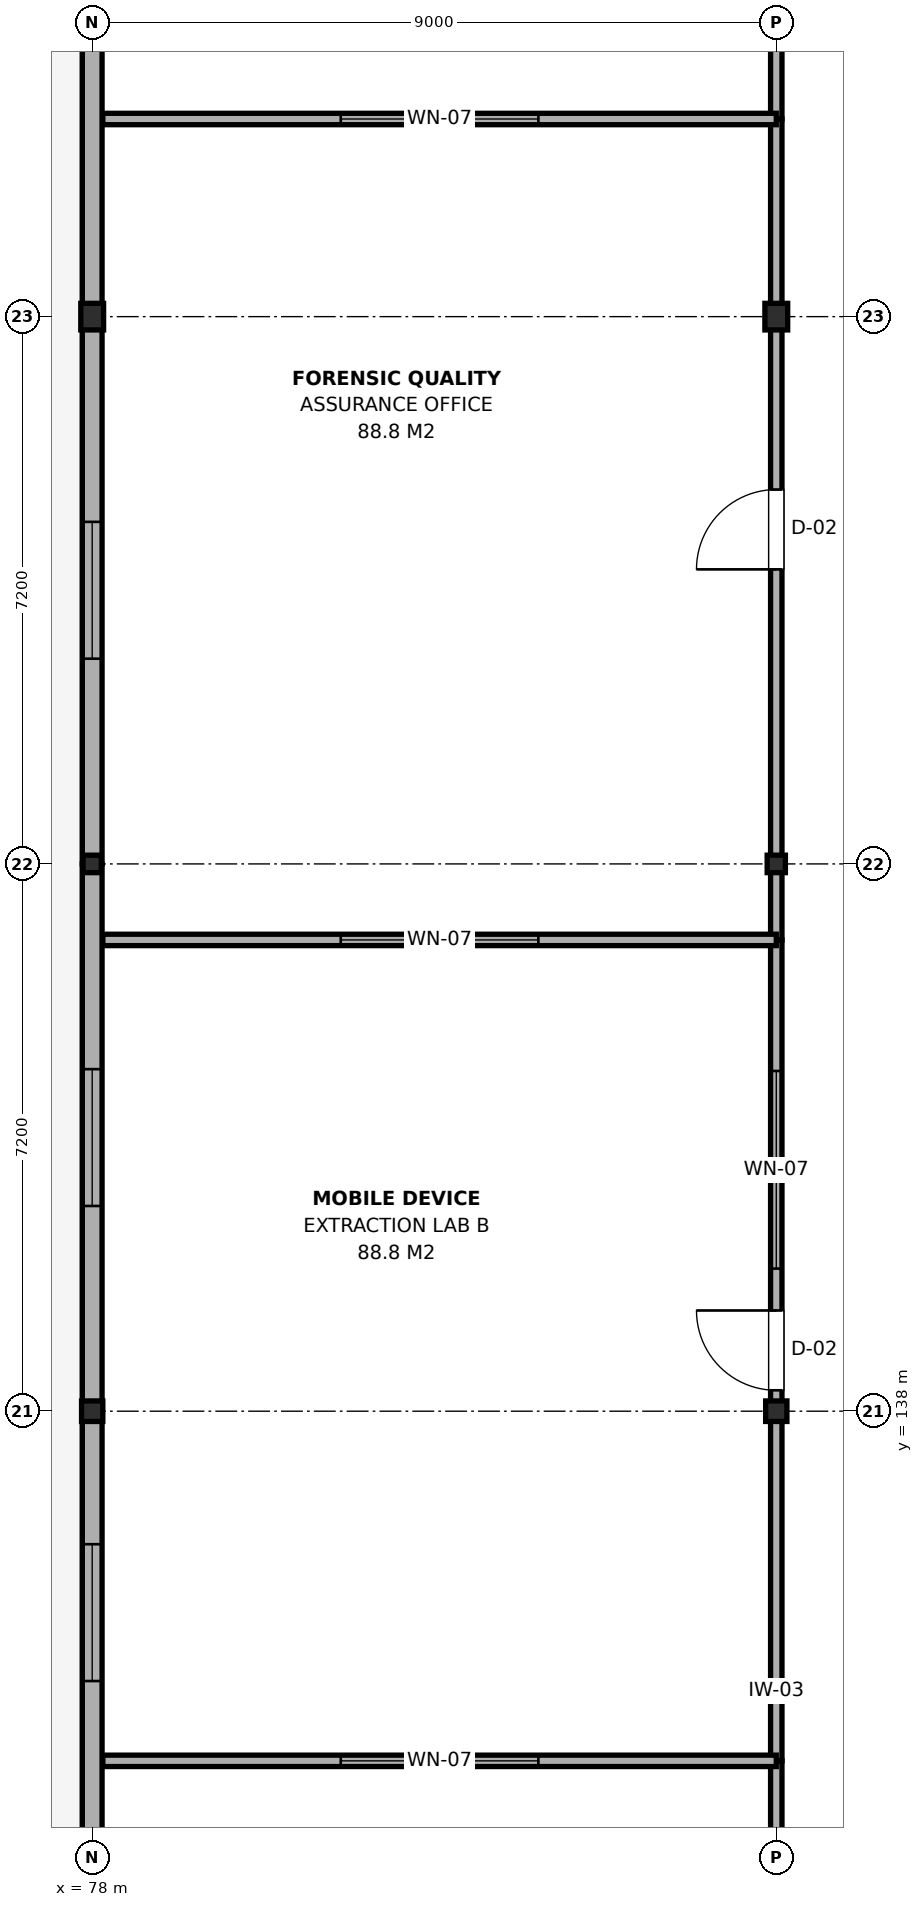
"""IFC4 building model, lengths in metres.
Left out: names, types, materials, properties, quantities, classifications, styles, units other than length and angle.
Written with IfcOpenShell. Run it as: python <this file> out.ifc"""

import sys

from ifc_helpers import new_model, si_unit, direction, frame, frame_2d, origin, origin_2d, place, context, subcontext, project, spatial, rectangle, i_section, extrude, element, fill, save


model = new_model("IFC4")
c1 = context("Model", 3, precision=1e-05, world=origin(), true_north=direction((0.0, 1.0)))
c2 = subcontext(c1, "Body", "Model", "MODEL_VIEW")
j1 = project(units=[si_unit("LENGTHUNIT", "METRE"), si_unit("PLANEANGLEUNIT", "RADIAN")], contexts=[c1])
p1 = place(None, origin())
s1 = spatial("IfcSite", under=j1, at=p1, CompositionType="ELEMENT")
p2 = place(p1, origin())
s2 = spatial("IfcBuilding", under=s1, at=p2, CompositionType="ELEMENT")
p3 = place(p2, frame((0.0, 0.0, 21.0)))
s3 = spatial("IfcBuildingStorey", under=s2, at=p3, CompositionType="ELEMENT", Elevation=21.0)
p4 = place(p3, frame((78.0, 138.0, 0.0), z_axis=(0.0, 0.0, 1.0), x_axis=(1.0, 0.0, 0.0)))
e1 = element("IfcColumn", 1, at=p4, inside=s3, PredefinedType="COLUMN", context=c2, shape_type="SweptSolid", body=[
    extrude(i_section(OverallWidth=0.28, OverallDepth=0.27, WebThickness=0.008, FlangeThickness=0.013, FilletRadius=0.024, at=origin_2d()), origin(), (0.0, 0.0, 1.0), 3.7),
])
p5 = place(p3, frame((78.0, 145.2, 0.0), z_axis=(0.0, 0.0, 1.0), x_axis=(1.0, 0.0, 0.0)))
e2 = element("IfcColumn", 2, at=p5, inside=s3, PredefinedType="COLUMN", context=c2, shape_type="SweptSolid", body=[
    extrude(i_section(OverallWidth=0.24, OverallDepth=0.23, WebThickness=0.008, FlangeThickness=0.012, FilletRadius=0.021, at=origin_2d()), origin(), (0.0, 0.0, 1.0), 3.7),
])
p6 = place(p3, frame((78.0, 152.4, 0.0), z_axis=(0.0, 0.0, 1.0), x_axis=(1.0, 0.0, 0.0)))
e3 = element("IfcColumn", 3, at=p6, inside=s3, PredefinedType="COLUMN", context=c2, shape_type="SweptSolid", body=[
    extrude(i_section(OverallWidth=0.3, OverallDepth=0.35, WebThickness=0.01, FlangeThickness=0.018, FilletRadius=0.027, at=origin_2d()), origin(), (0.0, 0.0, 1.0), 3.7),
])
p7 = place(p3, frame((87.0, 138.0, 0.0), z_axis=(0.0, 0.0, 1.0), x_axis=(1.0, 0.0, 0.0)))
e4 = element("IfcColumn", 4, at=p7, inside=s3, PredefinedType="COLUMN", context=c2, shape_type="SweptSolid", body=[
    extrude(i_section(OverallWidth=0.28, OverallDepth=0.27, WebThickness=0.008, FlangeThickness=0.013, FilletRadius=0.024, at=origin_2d()), origin(), (0.0, 0.0, 1.0), 3.7),
])
p8 = place(p3, frame((87.0, 145.2, 0.0), z_axis=(0.0, 0.0, 1.0), x_axis=(1.0, 0.0, 0.0)))
e5 = element("IfcColumn", 5, at=p8, inside=s3, PredefinedType="COLUMN", context=c2, shape_type="SweptSolid", body=[
    extrude(i_section(OverallWidth=0.24, OverallDepth=0.23, WebThickness=0.008, FlangeThickness=0.012, FilletRadius=0.021, at=origin_2d()), origin(), (0.0, 0.0, 1.0), 3.7),
])
p9 = place(p3, frame((87.0, 152.4, 0.0), z_axis=(0.0, 0.0, 1.0), x_axis=(1.0, 0.0, 0.0)))
e6 = element("IfcColumn", 6, at=p9, inside=s3, PredefinedType="COLUMN", context=c2, shape_type="SweptSolid", body=[
    extrude(i_section(OverallWidth=0.3, OverallDepth=0.35, WebThickness=0.01, FlangeThickness=0.018, FilletRadius=0.027, at=origin_2d()), origin(), (0.0, 0.0, 1.0), 3.7),
])
p10 = place(p3, frame((78.0, 130.8, 0.0), z_axis=(0.0, 0.0, 1.0), x_axis=(0.0, 1.0, 0.0)))
e7 = element("IfcWall", 7, at=p10, inside=s3, PredefinedType="SOLIDWALL", context=c2, shape_type="SweptSolid", body=[
    extrude(rectangle(XDim=7.2, YDim=0.26, at=frame_2d((3.6, 0.0))), origin(), (0.0, 0.0, 1.0), 3.195),
])
p11 = place(p10, frame((3.65, 0.0, 0.65)))
e8 = element("IfcOpeningElement", 8, at=p11, cuts=e7, PredefinedType="OPENING", context=c2, shape_type="SweptSolid", body=[
    extrude(rectangle(XDim=1.8, YDim=1.2, at=frame_2d((0.9, 0.6))), frame((0.0, 0.145, 0.0), z_axis=(0.0, -1.0, 0.0), x_axis=(1.0, 0.0, 0.0)), (0.0, 0.0, 1.0), 0.29),
])
p12 = place(p3, frame((78.0, 138.0, 0.0), z_axis=(0.0, 0.0, 1.0), x_axis=(0.0, 1.0, 0.0)))
e9 = element("IfcWall", 9, at=p12, inside=s3, PredefinedType="SOLIDWALL", context=c2, shape_type="SweptSolid", body=[
    extrude(rectangle(XDim=7.2, YDim=0.26, at=frame_2d((3.6, 0.0))), origin(), (0.0, 0.0, 1.0), 3.195),
])
p13 = place(p12, frame((2.7, 0.0, 0.65)))
e10 = element("IfcOpeningElement", 10, at=p13, cuts=e9, PredefinedType="OPENING", context=c2, shape_type="SweptSolid", body=[
    extrude(rectangle(XDim=1.8, YDim=1.2, at=frame_2d((0.9, 0.6))), frame((0.0, 0.145, 0.0), z_axis=(0.0, -1.0, 0.0), x_axis=(1.0, 0.0, 0.0)), (0.0, 0.0, 1.0), 0.29),
])
p14 = place(p3, frame((78.0, 145.2, 0.0), z_axis=(0.0, 0.0, 1.0), x_axis=(0.0, 1.0, 0.0)))
e11 = element("IfcWall", 11, at=p14, inside=s3, PredefinedType="SOLIDWALL", context=c2, shape_type="SweptSolid", body=[
    extrude(rectangle(XDim=7.2, YDim=0.26, at=frame_2d((3.6, 0.0))), origin(), (0.0, 0.0, 1.0), 3.245),
])
p15 = place(p14, frame((2.7, 0.0, 0.65)))
e12 = element("IfcOpeningElement", 12, at=p15, cuts=e11, PredefinedType="OPENING", context=c2, shape_type="SweptSolid", body=[
    extrude(rectangle(XDim=1.8, YDim=1.2, at=frame_2d((0.9, 0.6))), frame((0.0, 0.145, 0.0), z_axis=(0.0, -1.0, 0.0), x_axis=(1.0, 0.0, 0.0)), (0.0, 0.0, 1.0), 0.29),
])
p16 = place(p3, frame((78.0, 152.4, 0.0), z_axis=(0.0, 0.0, 1.0), x_axis=(0.0, 1.0, 0.0)))
e13 = element("IfcWall", 13, at=p16, inside=s3, PredefinedType="SOLIDWALL", context=c2, shape_type="SweptSolid", body=[
    extrude(rectangle(XDim=7.2, YDim=0.26, at=frame_2d((3.6, 0.0))), origin(), (0.0, 0.0, 1.0), 3.095),
])
p17 = place(p16, frame((3.65, 0.0, 0.65)))
e14 = element("IfcOpeningElement", 14, at=p17, cuts=e13, PredefinedType="OPENING", context=c2, shape_type="SweptSolid", body=[
    extrude(rectangle(XDim=1.8, YDim=1.2, at=frame_2d((0.9, 0.6))), frame((0.0, 0.145, 0.0), z_axis=(0.0, -1.0, 0.0), x_axis=(1.0, 0.0, 0.0)), (0.0, 0.0, 1.0), 0.29),
])
p18 = place(p3, frame((87.0, 122.56, 0.0), z_axis=(0.0, 0.0, 1.0), x_axis=(0.0, 1.0, 0.0)))
e15 = element("IfcWall", 15, at=p18, inside=s3, PredefinedType="PARTITIONING", context=c2, shape_type="SweptSolid", body=[
    extrude(rectangle(XDim=10.84, YDim=0.15, at=frame_2d((5.42, 0.0))), origin(), (0.0, 0.0, 1.0), 3.105),
])
p19 = place(p18, frame((4.895, 0.0, 0.0)))
e16 = element("IfcOpeningElement", 16, at=p19, cuts=e15, PredefinedType="OPENING", context=c2, shape_type="SweptSolid", body=[
    extrude(rectangle(XDim=1.05, YDim=2.15, at=frame_2d((0.525, 1.075))), frame((0.0, 0.09, 0.0), z_axis=(0.0, -1.0, 0.0), x_axis=(1.0, 0.0, 0.0)), (0.0, 0.0, 1.0), 0.18),
])
p20 = place(p3, frame((87.0, 133.4, 0.0), z_axis=(0.0, 0.0, 1.0), x_axis=(0.0, 1.0, 0.0)))
e17 = element("IfcWall", 17, at=p20, inside=s3, PredefinedType="PARTITIONING", context=c2, shape_type="SweptSolid", body=[
    extrude(rectangle(XDim=10.8, YDim=0.15, at=frame_2d((5.4, 0.0))), origin(), (0.0, 0.0, 1.0), 3.195),
])
p21 = place(p20, frame((4.875, 0.0, 0.0)))
e18 = element("IfcOpeningElement", 18, at=p21, cuts=e17, PredefinedType="OPENING", context=c2, shape_type="SweptSolid", body=[
    extrude(rectangle(XDim=1.05, YDim=2.15, at=frame_2d((0.525, 1.075))), frame((0.0, 0.09, 0.0), z_axis=(0.0, -1.0, 0.0), x_axis=(1.0, 0.0, 0.0)), (0.0, 0.0, 1.0), 0.18),
])
p22 = place(p20, frame((6.476, 0.0, 0.95)))
e19 = element("IfcOpeningElement", 19, at=p22, cuts=e17, PredefinedType="OPENING", context=c2, shape_type="SweptSolid", body=[
    extrude(rectangle(XDim=2.6, YDim=1.5, at=frame_2d((1.3, 0.75))), frame((0.0, 0.09, 0.0), z_axis=(0.0, -1.0, 0.0), x_axis=(1.0, 0.0, 0.0)), (0.0, 0.0, 1.0), 0.18),
])
p23 = place(p3, frame((78.14, 133.4, 0.0), z_axis=(0.0, 0.0, 1.0), x_axis=(1.0, 0.0, 0.0)))
e20 = element("IfcWall", 20, at=p23, inside=s3, PredefinedType="PARTITIONING", context=c2, shape_type="SweptSolid", body=[
    extrude(rectangle(XDim=8.86, YDim=0.15, at=frame_2d((4.43, 0.0))), origin(), (0.0, 0.0, 1.0), 3.195),
])
p24 = place(p23, frame((3.13, 0.0, 0.95)))
e21 = element("IfcOpeningElement", 21, at=p24, cuts=e20, PredefinedType="OPENING", context=c2, shape_type="SweptSolid", body=[
    extrude(rectangle(XDim=2.6, YDim=1.5, at=frame_2d((1.3, 0.75))), frame((0.0, 0.09, 0.0), z_axis=(0.0, -1.0, 0.0), x_axis=(1.0, 0.0, 0.0)), (0.0, 0.0, 1.0), 0.18),
])
p25 = place(p3, frame((87.0, 144.2, 0.0), z_axis=(0.0, 0.0, 1.0), x_axis=(0.0, 1.0, 0.0)))
e22 = element("IfcWall", 22, at=p25, inside=s3, PredefinedType="PARTITIONING", context=c2, shape_type="SweptSolid", body=[
    extrude(rectangle(XDim=10.8, YDim=0.15, at=frame_2d((5.4, 0.0))), origin(), (0.0, 0.0, 1.0), 3.105),
])
p26 = place(p25, frame((4.875, 0.0, 0.0)))
e23 = element("IfcOpeningElement", 23, at=p26, cuts=e22, PredefinedType="OPENING", context=c2, shape_type="SweptSolid", body=[
    extrude(rectangle(XDim=1.05, YDim=2.15, at=frame_2d((0.525, 1.075))), frame((0.0, 0.09, 0.0), z_axis=(0.0, -1.0, 0.0), x_axis=(1.0, 0.0, 0.0)), (0.0, 0.0, 1.0), 0.18),
])
p27 = place(p3, frame((78.14, 144.2, 0.0), z_axis=(0.0, 0.0, 1.0), x_axis=(1.0, 0.0, 0.0)))
e24 = element("IfcWall", 24, at=p27, inside=s3, PredefinedType="PARTITIONING", context=c2, shape_type="SweptSolid", body=[
    extrude(rectangle(XDim=8.86, YDim=0.15, at=frame_2d((4.43, 0.0))), origin(), (0.0, 0.0, 1.0), 3.245),
])
p28 = place(p27, frame((3.13, 0.0, 0.95)))
e25 = element("IfcOpeningElement", 25, at=p28, cuts=e24, PredefinedType="OPENING", context=c2, shape_type="SweptSolid", body=[
    extrude(rectangle(XDim=2.6, YDim=1.5, at=frame_2d((1.3, 0.75))), frame((0.0, 0.09, 0.0), z_axis=(0.0, -1.0, 0.0), x_axis=(1.0, 0.0, 0.0)), (0.0, 0.0, 1.0), 0.18),
])
p29 = place(p3, frame((87.0, 155.0, 0.0), z_axis=(0.0, 0.0, 1.0), x_axis=(0.0, 1.0, 0.0)))
e26 = element("IfcWall", 26, at=p29, inside=s3, PredefinedType="PARTITIONING", context=c2, shape_type="SweptSolid", body=[
    extrude(rectangle(XDim=11.24, YDim=0.15, at=frame_2d((5.62, 0.0))), origin(), (0.0, 0.0, 1.0), 3.095),
])
p30 = place(p29, frame((4.87, 0.0, 0.0)))
e27 = element("IfcOpeningElement", 27, at=p30, cuts=e26, PredefinedType="OPENING", context=c2, shape_type="SweptSolid", body=[
    extrude(rectangle(XDim=1.5, YDim=2.15, at=frame_2d((0.75, 1.075))), frame((0.0, 0.09, 0.0), z_axis=(0.0, -1.0, 0.0), x_axis=(1.0, 0.0, 0.0)), (0.0, 0.0, 1.0), 0.18),
])
p31 = place(p3, frame((78.14, 155.0, 0.0), z_axis=(0.0, 0.0, 1.0), x_axis=(1.0, 0.0, 0.0)))
e28 = element("IfcWall", 28, at=p31, inside=s3, PredefinedType="PARTITIONING", context=c2, shape_type="SweptSolid", body=[
    extrude(rectangle(XDim=8.86, YDim=0.15, at=frame_2d((4.43, 0.0))), origin(), (0.0, 0.0, 1.0), 3.365),
])
p32 = place(p31, frame((3.13, 0.0, 0.95)))
e29 = element("IfcOpeningElement", 29, at=p32, cuts=e28, PredefinedType="OPENING", context=c2, shape_type="SweptSolid", body=[
    extrude(rectangle(XDim=2.6, YDim=1.5, at=frame_2d((1.3, 0.75))), frame((0.0, 0.09, 0.0), z_axis=(0.0, -1.0, 0.0), x_axis=(1.0, 0.0, 0.0)), (0.0, 0.0, 1.0), 0.18),
])
p33 = place(p11, origin())
e30 = element("IfcWindow", 30, at=p33, inside=s3, PartitioningType="SINGLE_PANEL", PredefinedType="WINDOW", context=c2, shape_type="SweptSolid", body=[
    extrude(rectangle(XDim=1.8, YDim=1.2, at=frame_2d((0.9, 0.6))), frame((0.0, 0.03, 0.0), z_axis=(0.0, -1.0, 0.0), x_axis=(1.0, 0.0, 0.0)), (0.0, 0.0, 1.0), 0.06),
])
fill(e8, e30)
p34 = place(p13, origin())
e31 = element("IfcWindow", 31, at=p34, inside=s3, PartitioningType="SINGLE_PANEL", PredefinedType="WINDOW", context=c2, shape_type="SweptSolid", body=[
    extrude(rectangle(XDim=1.8, YDim=1.2, at=frame_2d((0.9, 0.6))), frame((0.0, 0.03, 0.0), z_axis=(0.0, -1.0, 0.0), x_axis=(1.0, 0.0, 0.0)), (0.0, 0.0, 1.0), 0.06),
])
fill(e10, e31)
p35 = place(p15, origin())
e32 = element("IfcWindow", 32, at=p35, inside=s3, PartitioningType="SINGLE_PANEL", PredefinedType="WINDOW", context=c2, shape_type="SweptSolid", body=[
    extrude(rectangle(XDim=1.8, YDim=1.2, at=frame_2d((0.9, 0.6))), frame((0.0, 0.03, 0.0), z_axis=(0.0, -1.0, 0.0), x_axis=(1.0, 0.0, 0.0)), (0.0, 0.0, 1.0), 0.06),
])
fill(e12, e32)
p36 = place(p21, origin())
e33 = element("IfcDoor", 33, at=p36, inside=s3, OperationType="SINGLE_SWING_RIGHT", PredefinedType="DOOR", context=c2, shape_type="SweptSolid", body=[
    extrude(rectangle(XDim=1.05, YDim=2.15, at=frame_2d((0.525, 1.075))), frame((0.0, 0.025, 0.0), z_axis=(0.0, -1.0, 0.0), x_axis=(1.0, 0.0, 0.0)), (0.0, 0.0, 1.0), 0.05),
])
fill(e18, e33)
p37 = place(p22, origin())
e34 = element("IfcWindow", 34, at=p37, inside=s3, PartitioningType="SINGLE_PANEL", PredefinedType="WINDOW", context=c2, shape_type="SweptSolid", body=[
    extrude(rectangle(XDim=2.6, YDim=1.5, at=frame_2d((1.3, 0.75))), frame((0.0, 0.03, 0.0), z_axis=(0.0, -1.0, 0.0), x_axis=(1.0, 0.0, 0.0)), (0.0, 0.0, 1.0), 0.06),
])
fill(e19, e34)
p38 = place(p24, origin())
e35 = element("IfcWindow", 35, at=p38, inside=s3, PartitioningType="SINGLE_PANEL", PredefinedType="WINDOW", context=c2, shape_type="SweptSolid", body=[
    extrude(rectangle(XDim=2.6, YDim=1.5, at=frame_2d((1.3, 0.75))), frame((0.0, 0.03, 0.0), z_axis=(0.0, -1.0, 0.0), x_axis=(1.0, 0.0, 0.0)), (0.0, 0.0, 1.0), 0.06),
])
fill(e21, e35)
p39 = place(p26, origin())
e36 = element("IfcDoor", 36, at=p39, inside=s3, OperationType="SINGLE_SWING_LEFT", PredefinedType="DOOR", context=c2, shape_type="SweptSolid", body=[
    extrude(rectangle(XDim=1.05, YDim=2.15, at=frame_2d((0.525, 1.075))), frame((0.0, 0.025, 0.0), z_axis=(0.0, -1.0, 0.0), x_axis=(1.0, 0.0, 0.0)), (0.0, 0.0, 1.0), 0.05),
])
fill(e23, e36)
p40 = place(p28, origin())
e37 = element("IfcWindow", 37, at=p40, inside=s3, PartitioningType="SINGLE_PANEL", PredefinedType="WINDOW", context=c2, shape_type="SweptSolid", body=[
    extrude(rectangle(XDim=2.6, YDim=1.5, at=frame_2d((1.3, 0.75))), frame((0.0, 0.03, 0.0), z_axis=(0.0, -1.0, 0.0), x_axis=(1.0, 0.0, 0.0)), (0.0, 0.0, 1.0), 0.06),
])
fill(e25, e37)
p41 = place(p32, origin())
e38 = element("IfcWindow", 38, at=p41, inside=s3, PartitioningType="SINGLE_PANEL", PredefinedType="WINDOW", context=c2, shape_type="SweptSolid", body=[
    extrude(rectangle(XDim=2.6, YDim=1.5, at=frame_2d((1.3, 0.75))), frame((0.0, 0.03, 0.0), z_axis=(0.0, -1.0, 0.0), x_axis=(1.0, 0.0, 0.0)), (0.0, 0.0, 1.0), 0.06),
])
fill(e29, e38)
save(model, sys.argv[1])
